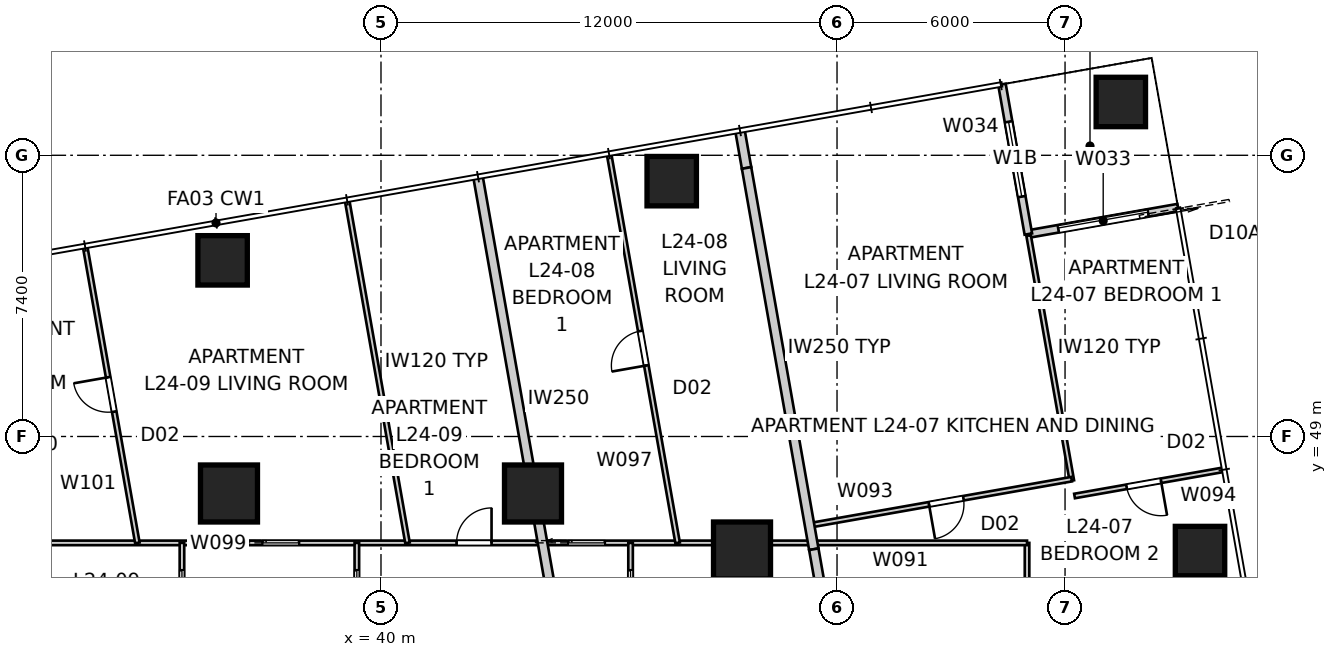
"""IFC4 building model, lengths in metres.
Left out: names, types, materials, properties, quantities, classifications, styles, units other than length and angle.
Written with IfcOpenShell. Run it as: python <this file> out.ifc"""

import sys

from ifc_helpers import new_model, si_unit, direction, frame, frame_2d, origin, origin_2d, place, context, subcontext, project, spatial, rectangle, extrude, element, fill, save


model = new_model("IFC4")
c1 = context("Model", 3, precision=1e-05, world=origin(), true_north=direction((0.0, 1.0)))
c2 = subcontext(c1, "Body", "Model", "MODEL_VIEW")
j1 = project(units=[si_unit("LENGTHUNIT", "METRE"), si_unit("PLANEANGLEUNIT", "RADIAN")], contexts=[c1])
p1 = place(None, origin())
s1 = spatial("IfcSite", under=j1, at=p1, CompositionType="ELEMENT")
p2 = place(p1, origin())
s2 = spatial("IfcBuilding", under=s1, at=p2, CompositionType="ELEMENT")
p3 = place(p2, frame((0.0, 0.0, 89.6)))
s3 = spatial("IfcBuildingStorey", under=s2, at=p3, CompositionType="ELEMENT", Elevation=89.6)
for number, where, z_axis, x_axis in (
    (1, (61.552, 45.985, 0.0), (0.0, 0.0, 1.0), (1.0, 0.0, 0.0)),
    (2, (59.468, 57.803, 0.0), (0.0, 0.0, 1.0), (1.0, 0.0, 0.0)),
    (3, (47.65, 55.719, 0.0), (0.0, 0.0, 1.0), (1.0, 0.0, 0.0)),
    (4, (35.833, 53.635, 0.0), (0.0, 0.0, 1.0), (1.0, 0.0, 0.0)),
):
    element("IfcColumn", number, at=place(p3, frame(where, z_axis=z_axis, x_axis=x_axis)), inside=s3, PredefinedType="COLUMN", context=c2, shape_type="SweptSolid", body=[
        extrude(rectangle(XDim=1.3, YDim=1.3, at=origin_2d()), origin(), (0.0, 0.0, 1.0), 3.4),
    ])
for number, where, z_axis, x_axis in (
    (5, (49.5, 46.0, 0.0), (0.0, 0.0, 1.0), (1.0, 0.0, 0.0)),
    (6, (44.0, 47.5, 0.0), (0.0, 0.0, 1.0), (1.0, 0.0, 0.0)),
    (7, (36.0, 47.5, 0.0), (0.0, 0.0, 1.0), (1.0, 0.0, 0.0)),
):
    element("IfcColumn", number, at=place(p3, frame(where, z_axis=z_axis, x_axis=x_axis)), inside=s3, PredefinedType="COLUMN", context=c2, shape_type="SweptSolid", body=[
        extrude(rectangle(XDim=1.5, YDim=1.5, at=origin_2d()), origin(), (0.0, 0.0, 1.0), 3.4),
    ])
p4 = place(p3, frame((60.974, 55.022, 0.0), z_axis=(0.0, 0.0, 1.0), x_axis=(-0.984808127031, -0.173646056486, 0.0)))
e8 = element("IfcWall", 8, at=p4, inside=s3, PredefinedType="SOLIDWALL", context=c2, shape_type="SweptSolid", body=[
    extrude(rectangle(XDim=4.0, YDim=0.2, at=frame_2d((2.0, 0.0))), origin(), (0.0, 0.0, 1.0), 3.25),
])
p5 = place(p4, frame((0.8, 0.0, 0.0)))
e9 = element("IfcOpeningElement", 9, at=p5, cuts=e8, PredefinedType="OPENING", context=c2, shape_type="SweptSolid", body=[
    extrude(rectangle(XDim=2.4, YDim=2.1, at=frame_2d((1.2, 1.05))), frame((0.0, 0.11, 0.0), z_axis=(0.0, -1.0, 0.0), x_axis=(1.0, 0.0, 0.0)), (0.0, 0.0, 1.0), 0.22),
])
p6 = place(p3, frame((57.034, 54.328, 0.0), z_axis=(0.0, 0.0, 1.0), x_axis=(-0.173646056486, 0.984808127031, 0.0)))
e10 = element("IfcWall", 10, at=p6, inside=s3, PredefinedType="SOLIDWALL", context=c2, shape_type="SweptSolid", body=[
    extrude(rectangle(XDim=4.0, YDim=0.2, at=frame_2d((2.0, 0.0))), origin(), (0.0, 0.0, 1.0), 3.25),
])
p7 = place(p6, frame((1.0, 0.0, 0.45)))
e11 = element("IfcOpeningElement", 11, at=p7, cuts=e10, PredefinedType="OPENING", context=c2, shape_type="SweptSolid", body=[
    extrude(rectangle(XDim=2.0, YDim=1.8, at=frame_2d((1.0, 0.9))), frame((0.0, 0.11, 0.0), z_axis=(0.0, -1.0, 0.0), x_axis=(1.0, 0.0, 0.0)), (0.0, 0.0, 1.0), 0.22),
])
p8 = place(p3, frame((42.552, 55.836, 0.0), z_axis=(0.0, 0.0, 1.0), x_axis=(0.173639677872, -0.984809251718, 0.0)))
e12 = element("IfcWall", 12, at=p8, inside=s3, PredefinedType="PARTITIONING", context=c2, shape_type="SweptSolid", body=[
    extrude(rectangle(XDim=12.24, YDim=0.25, at=frame_2d((6.12, 0.0))), origin(), (0.0, 0.0, 1.0), 3.25),
])
p9 = place(p3, frame((49.446, 57.051, 0.0), z_axis=(0.0, 0.0, 1.0), x_axis=(0.173813186416, -0.984778643263, 0.0)))
e13 = element("IfcWall", 13, at=p9, inside=s3, PredefinedType="PARTITIONING", context=c2, shape_type="SweptSolid", body=[
    extrude(rectangle(XDim=1.0, YDim=0.25, at=frame_2d((0.5, 0.0))), origin(), (0.0, 0.0, 1.0), 3.25),
])
p10 = place(p3, frame((49.62, 56.066, 0.0), z_axis=(0.0, 0.0, 1.0), x_axis=(0.173644522411, -0.984808397525, 0.0)))
e14 = element("IfcWall", 14, at=p10, inside=s3, PredefinedType="PARTITIONING", context=c2, shape_type="SweptSolid", body=[
    extrude(rectangle(XDim=10.188, YDim=0.25, at=frame_2d((5.094, 0.0))), origin(), (0.0, 0.0, 1.0), 2.638),
])
p11 = place(p3, frame((51.389, 46.033, 0.0), z_axis=(0.0, 0.0, 1.0), x_axis=(0.173657387043, -0.984806129106, 0.0)))
e15 = element("IfcWall", 15, at=p11, inside=s3, PredefinedType="PARTITIONING", context=c2, shape_type="SweptSolid", body=[
    extrude(rectangle(XDim=2.286, YDim=0.25, at=frame_2d((1.143, 0.0))), origin(), (0.0, 0.0, 1.0), 3.25),
])
p12 = place(p3, frame((57.0, 46.2, 0.0), z_axis=(0.0, 0.0, 1.0), x_axis=(0.0, -1.0, 0.0)))
e16 = element("IfcWall", 16, at=p12, inside=s3, PredefinedType="PARTITIONING", context=c2, shape_type="SweptSolid", body=[
    extrude(rectangle(XDim=32.4, YDim=0.12, at=frame_2d((16.2, 0.0))), origin(), (0.0, 0.0, 1.0), 2.55),
])
p13 = place(p12, frame((10.396, 0.0, 0.0)))
e17 = element("IfcOpeningElement", 17, at=p13, cuts=e16, PredefinedType="OPENING", context=c2, shape_type="SweptSolid", body=[
    extrude(rectangle(XDim=0.92, YDim=2.34, at=frame_2d((0.46, 1.17))), frame((0.0, 0.07, 0.0), z_axis=(0.0, -1.0, 0.0), x_axis=(1.0, 0.0, 0.0)), (0.0, 0.0, 1.0), 0.14),
])
p14 = place(p12, frame((7.587, 0.0, 0.0)))
e18 = element("IfcOpeningElement", 18, at=p14, cuts=e16, PredefinedType="OPENING", context=c2, shape_type="SweptSolid", body=[
    extrude(rectangle(XDim=0.92, YDim=2.34, at=frame_2d((0.46, 1.17))), frame((0.0, 0.07, 0.0), z_axis=(0.0, -1.0, 0.0), x_axis=(1.0, 0.0, 0.0)), (0.0, 0.0, 1.0), 0.14),
])
p15 = place(p12, frame((3.843, 0.0, 0.0)))
e19 = element("IfcOpeningElement", 19, at=p15, cuts=e16, PredefinedType="OPENING", context=c2, shape_type="SweptSolid", body=[
    extrude(rectangle(XDim=0.92, YDim=2.34, at=frame_2d((0.46, 1.17))), frame((0.0, 0.07, 0.0), z_axis=(0.0, -1.0, 0.0), x_axis=(1.0, 0.0, 0.0)), (0.0, 0.0, 1.0), 0.14),
])
p16 = place(p12, frame((27.988, 0.0, 0.0)))
e20 = element("IfcOpeningElement", 20, at=p16, cuts=e16, PredefinedType="OPENING", context=c2, shape_type="SweptSolid", body=[
    extrude(rectangle(XDim=0.92, YDim=2.34, at=frame_2d((0.46, 1.17))), frame((0.0, 0.07, 0.0), z_axis=(0.0, -1.0, 0.0), x_axis=(1.0, 0.0, 0.0)), (0.0, 0.0, 1.0), 0.14),
])
p17 = place(p12, frame((23.957, 0.0, 0.0)))
e21 = element("IfcOpeningElement", 21, at=p17, cuts=e16, PredefinedType="OPENING", context=c2, shape_type="SweptSolid", body=[
    extrude(rectangle(XDim=0.96, YDim=2.1, at=frame_2d((0.48, 1.05))), frame((0.0, 0.07, 0.0), z_axis=(0.0, -1.0, 0.0), x_axis=(1.0, 0.0, 0.0)), (0.0, 0.0, 1.0), 0.14),
])
p18 = place(p12, frame((21.108, 0.0, 0.0)))
e22 = element("IfcOpeningElement", 22, at=p18, cuts=e16, PredefinedType="OPENING", context=c2, shape_type="SweptSolid", body=[
    extrude(rectangle(XDim=0.96, YDim=2.1, at=frame_2d((0.48, 1.05))), frame((0.0, 0.07, 0.0), z_axis=(0.0, -1.0, 0.0), x_axis=(1.0, 0.0, 0.0)), (0.0, 0.0, 1.0), 0.14),
])
p19 = place(p3, frame((23.0, 46.2, 0.0), z_axis=(0.0, 0.0, 1.0), x_axis=(1.0, 0.0, 0.0)))
e23 = element("IfcWall", 23, at=p19, inside=s3, PredefinedType="PARTITIONING", context=c2, shape_type="SweptSolid", body=[
    extrude(rectangle(XDim=34.0, YDim=0.12, at=frame_2d((17.0, 0.0))), origin(), (0.0, 0.0, 1.0), 2.55),
])
p20 = place(p19, frame((18.989, 0.0, 0.0)))
e24 = element("IfcOpeningElement", 24, at=p20, cuts=e23, PredefinedType="OPENING", context=c2, shape_type="SweptSolid", body=[
    extrude(rectangle(XDim=0.92, YDim=2.34, at=frame_2d((0.46, 1.17))), frame((0.0, 0.07, 0.0), z_axis=(0.0, -1.0, 0.0), x_axis=(1.0, 0.0, 0.0)), (0.0, 0.0, 1.0), 0.14),
])
p21 = place(p19, frame((1.306, 0.0, 0.0)))
e25 = element("IfcOpeningElement", 25, at=p21, cuts=e23, PredefinedType="OPENING", context=c2, shape_type="SweptSolid", body=[
    extrude(rectangle(XDim=0.92, YDim=2.34, at=frame_2d((0.46, 1.17))), frame((0.0, 0.07, 0.0), z_axis=(0.0, -1.0, 0.0), x_axis=(1.0, 0.0, 0.0)), (0.0, 0.0, 1.0), 0.14),
])
p22 = place(p19, frame((13.884, 0.0, 0.0)))
e26 = element("IfcOpeningElement", 26, at=p22, cuts=e23, PredefinedType="OPENING", context=c2, shape_type="SweptSolid", body=[
    extrude(rectangle(XDim=0.96, YDim=2.1, at=frame_2d((0.48, 1.05))), frame((0.0, 0.07, 0.0), z_axis=(0.0, -1.0, 0.0), x_axis=(1.0, 0.0, 0.0)), (0.0, 0.0, 1.0), 0.14),
])
p23 = place(p19, frame((21.929, 0.0, 0.0)))
e27 = element("IfcOpeningElement", 27, at=p23, cuts=e23, PredefinedType="OPENING", context=c2, shape_type="SweptSolid", body=[
    extrude(rectangle(XDim=0.96, YDim=2.1, at=frame_2d((0.48, 1.05))), frame((0.0, 0.07, 0.0), z_axis=(0.0, -1.0, 0.0), x_axis=(1.0, 0.0, 0.0)), (0.0, 0.0, 1.0), 0.14),
])
p24 = place(p3, frame((57.041, 54.288, 0.0), z_axis=(0.0, 0.0, 1.0), x_axis=(0.173657751636, -0.984806064815, 0.0)))
e28 = element("IfcWall", 28, at=p24, inside=s3, PredefinedType="PARTITIONING", context=c2, shape_type="SweptSolid", body=[
    extrude(rectangle(XDim=6.55, YDim=0.12, at=frame_2d((3.275, 0.0))), origin(), (0.0, 0.0, 1.0), 3.25),
])
p25 = place(p3, frame((58.172, 47.877, 0.0), z_axis=(0.0, 0.0, 1.0), x_axis=(-0.984806372973, -0.173656004074, 0.0)))
e29 = element("IfcWall", 29, at=p25, inside=s3, PredefinedType="PARTITIONING", context=c2, shape_type="SweptSolid", body=[
    extrude(rectangle(XDim=7.0, YDim=0.12, at=frame_2d((3.5, 0.0))), origin(), (0.0, 0.0, 1.0), 3.25),
])
p26 = place(p25, frame((2.89, 0.0, 0.0)))
e30 = element("IfcOpeningElement", 30, at=p26, cuts=e29, PredefinedType="OPENING", context=c2, shape_type="SweptSolid", body=[
    extrude(rectangle(XDim=0.92, YDim=2.34, at=frame_2d((0.46, 1.17))), frame((0.0, 0.07, 0.0), z_axis=(0.0, -1.0, 0.0), x_axis=(1.0, 0.0, 0.0)), (0.0, 0.0, 1.0), 0.14),
])
p27 = place(p3, frame((62.15, 48.122, 0.0), z_axis=(0.0, 0.0, 1.0), x_axis=(-0.984804033163, -0.173669272657, 0.0)))
e31 = element("IfcWall", 31, at=p27, inside=s3, PredefinedType="PARTITIONING", context=c2, shape_type="SweptSolid", body=[
    extrude(rectangle(XDim=3.96, YDim=0.12, at=frame_2d((1.98, 0.0))), origin(), (0.0, 0.0, 1.0), 2.638),
])
p28 = place(p27, frame((1.65, 0.0, 0.0)))
e32 = element("IfcOpeningElement", 32, at=p28, cuts=e31, PredefinedType="OPENING", context=c2, shape_type="SweptSolid", body=[
    extrude(rectangle(XDim=0.92, YDim=2.34, at=frame_2d((0.46, 1.17))), frame((0.0, 0.07, 0.0), z_axis=(0.0, -1.0, 0.0), x_axis=(1.0, 0.0, 0.0)), (0.0, 0.0, 1.0), 0.14),
])
p29 = place(p3, frame((46.567, 43.8, 0.0), z_axis=(0.0, 0.0, 1.0), x_axis=(0.0, 1.0, 0.0)))
e33 = element("IfcWall", 33, at=p29, inside=s3, PredefinedType="PARTITIONING", context=c2, shape_type="SweptSolid", body=[
    extrude(rectangle(XDim=2.4, YDim=0.12, at=frame_2d((1.2, 0.0))), origin(), (0.0, 0.0, 1.0), 3.25),
])
p30 = place(p29, frame((0.72, 0.0, 0.0)))
e34 = element("IfcOpeningElement", 34, at=p30, cuts=e33, PredefinedType="OPENING", context=c2, shape_type="SweptSolid", body=[
    extrude(rectangle(XDim=0.96, YDim=2.1, at=frame_2d((0.48, 1.05))), frame((0.0, 0.07, 0.0), z_axis=(0.0, -1.0, 0.0), x_axis=(1.0, 0.0, 0.0)), (0.0, 0.0, 1.0), 0.14),
])
p31 = place(p3, frame((47.805, 46.2, 0.0), z_axis=(0.0, 0.0, 1.0), x_axis=(-0.173653605279, 0.984806795962, 0.0)))
e35 = element("IfcWall", 35, at=p31, inside=s3, PredefinedType="PARTITIONING", context=c2, shape_type="SweptSolid", body=[
    extrude(rectangle(XDim=10.362, YDim=0.12, at=frame_2d((5.181, 0.0))), origin(), (0.0, 0.0, 1.0), 3.25),
])
p32 = place(p31, frame((4.741, 0.0, 0.0)))
e36 = element("IfcOpeningElement", 36, at=p32, cuts=e35, PredefinedType="OPENING", context=c2, shape_type="SweptSolid", body=[
    extrude(rectangle(XDim=0.92, YDim=2.34, at=frame_2d((0.46, 1.17))), frame((0.0, 0.07, 0.0), z_axis=(0.0, -1.0, 0.0), x_axis=(1.0, 0.0, 0.0)), (0.0, 0.0, 1.0), 0.14),
])
p33 = place(p3, frame((39.365, 43.8, 0.0), z_axis=(0.0, 0.0, 1.0), x_axis=(0.0, 1.0, 0.0)))
e37 = element("IfcWall", 37, at=p33, inside=s3, PredefinedType="PARTITIONING", context=c2, shape_type="SweptSolid", body=[
    extrude(rectangle(XDim=2.4, YDim=0.12, at=frame_2d((1.2, 0.0))), origin(), (0.0, 0.0, 1.0), 3.25),
])
p34 = place(p33, frame((0.72, 0.0, 0.0)))
e38 = element("IfcOpeningElement", 38, at=p34, cuts=e37, PredefinedType="OPENING", context=c2, shape_type="SweptSolid", body=[
    extrude(rectangle(XDim=0.96, YDim=2.1, at=frame_2d((0.48, 1.05))), frame((0.0, 0.07, 0.0), z_axis=(0.0, -1.0, 0.0), x_axis=(1.0, 0.0, 0.0)), (0.0, 0.0, 1.0), 0.14),
])
p35 = place(p3, frame((34.763, 43.8, 0.0), z_axis=(0.0, 0.0, 1.0), x_axis=(0.0, 1.0, 0.0)))
e39 = element("IfcWall", 39, at=p35, inside=s3, PredefinedType="PARTITIONING", context=c2, shape_type="SweptSolid", body=[
    extrude(rectangle(XDim=2.4, YDim=0.12, at=frame_2d((1.2, 0.0))), origin(), (0.0, 0.0, 1.0), 3.25),
])
p36 = place(p35, frame((0.72, 0.0, 0.0)))
e40 = element("IfcOpeningElement", 40, at=p36, cuts=e39, PredefinedType="OPENING", context=c2, shape_type="SweptSolid", body=[
    extrude(rectangle(XDim=0.96, YDim=2.1, at=frame_2d((0.48, 1.05))), frame((0.0, 0.07, 0.0), z_axis=(0.0, -1.0, 0.0), x_axis=(1.0, 0.0, 0.0)), (0.0, 0.0, 1.0), 0.14),
])
p37 = place(p3, frame((39.113, 55.188, 0.0), z_axis=(0.0, 0.0, 1.0), x_axis=(0.173652576186, -0.984806977424, 0.0)))
e41 = element("IfcWall", 41, at=p37, inside=s3, PredefinedType="PARTITIONING", context=c2, shape_type="SweptSolid", body=[
    extrude(rectangle(XDim=9.127, YDim=0.12, at=frame_2d((4.563, 0.0))), origin(), (0.0, 0.0, 1.0), 3.25),
])
p38 = place(p3, frame((33.59, 46.2, 0.0), z_axis=(0.0, 0.0, 1.0), x_axis=(-0.173645935638, 0.98480814834, 0.0)))
e42 = element("IfcWall", 42, at=p38, inside=s3, PredefinedType="PARTITIONING", context=c2, shape_type="SweptSolid", body=[
    extrude(rectangle(XDim=7.893, YDim=0.12, at=frame_2d((3.947, 0.0))), origin(), (0.0, 0.0, 1.0), 3.25),
])
p39 = place(p38, frame((3.507, 0.0, 0.0)))
e43 = element("IfcOpeningElement", 43, at=p39, cuts=e42, PredefinedType="OPENING", context=c2, shape_type="SweptSolid", body=[
    extrude(rectangle(XDim=0.92, YDim=2.34, at=frame_2d((0.46, 1.17))), frame((0.0, 0.07, 0.0), z_axis=(0.0, -1.0, 0.0), x_axis=(1.0, 0.0, 0.0)), (0.0, 0.0, 1.0), 0.14),
])
p40 = place(p5, origin())
e44 = element("IfcDoor", 44, at=p40, inside=s3, OperationType="SLIDING_TO_LEFT", PredefinedType="DOOR", context=c2, shape_type="SweptSolid", body=[
    extrude(rectangle(XDim=2.4, YDim=2.1, at=frame_2d((1.2, 1.05))), frame((0.0, 0.025, 0.0), z_axis=(0.0, -1.0, 0.0), x_axis=(1.0, 0.0, 0.0)), (0.0, 0.0, 1.0), 0.05),
])
fill(e9, e44)
p41 = place(p7, origin())
e45 = element("IfcWindow", 45, at=p41, inside=s3, PartitioningType="SINGLE_PANEL", PredefinedType="WINDOW", context=c2, shape_type="SweptSolid", body=[
    extrude(rectangle(XDim=2.0, YDim=1.8, at=frame_2d((1.0, 0.9))), frame((0.0, 0.03, 0.0), z_axis=(0.0, -1.0, 0.0), x_axis=(1.0, 0.0, 0.0)), (0.0, 0.0, 1.0), 0.06),
])
fill(e11, e45)
p42 = place(p20, origin())
e46 = element("IfcDoor", 46, at=p42, inside=s3, OperationType="SINGLE_SWING_RIGHT", PredefinedType="DOOR", context=c2, shape_type="SweptSolid", body=[
    extrude(rectangle(XDim=0.92, YDim=2.34, at=frame_2d((0.46, 1.17))), frame((0.0, 0.025, 0.0), z_axis=(0.0, -1.0, 0.0), x_axis=(1.0, 0.0, 0.0)), (0.0, 0.0, 1.0), 0.05),
])
fill(e24, e46)
p43 = place(p34, origin())
e47 = element("IfcDoor", 47, at=p43, inside=s3, OperationType="SLIDING_TO_LEFT", PredefinedType="DOOR", context=c2, shape_type="SweptSolid", body=[
    extrude(rectangle(XDim=0.96, YDim=2.1, at=frame_2d((0.48, 1.05))), frame((0.0, 0.025, 0.0), z_axis=(0.0, -1.0, 0.0), x_axis=(1.0, 0.0, 0.0)), (0.0, 0.0, 1.0), 0.05),
])
fill(e38, e47)
p44 = place(p30, origin())
e48 = element("IfcDoor", 48, at=p44, inside=s3, OperationType="SLIDING_TO_LEFT", PredefinedType="DOOR", context=c2, shape_type="SweptSolid", body=[
    extrude(rectangle(XDim=0.96, YDim=2.1, at=frame_2d((0.48, 1.05))), frame((0.0, 0.025, 0.0), z_axis=(0.0, -1.0, 0.0), x_axis=(1.0, 0.0, 0.0)), (0.0, 0.0, 1.0), 0.05),
])
fill(e34, e48)
p45 = place(p22, origin())
e49 = element("IfcDoor", 49, at=p45, inside=s3, OperationType="SLIDING_TO_LEFT", PredefinedType="DOOR", context=c2, shape_type="SweptSolid", body=[
    extrude(rectangle(XDim=0.96, YDim=2.1, at=frame_2d((0.48, 1.05))), frame((0.0, 0.025, 0.0), z_axis=(0.0, -1.0, 0.0), x_axis=(1.0, 0.0, 0.0)), (0.0, 0.0, 1.0), 0.05),
])
fill(e26, e49)
p46 = place(p36, origin())
e50 = element("IfcDoor", 50, at=p46, inside=s3, OperationType="SLIDING_TO_LEFT", PredefinedType="DOOR", context=c2, shape_type="SweptSolid", body=[
    extrude(rectangle(XDim=0.96, YDim=2.1, at=frame_2d((0.48, 1.05))), frame((0.0, 0.025, 0.0), z_axis=(0.0, -1.0, 0.0), x_axis=(1.0, 0.0, 0.0)), (0.0, 0.0, 1.0), 0.05),
])
fill(e40, e50)
p47 = place(p23, origin())
e51 = element("IfcDoor", 51, at=p47, inside=s3, OperationType="SLIDING_TO_LEFT", PredefinedType="DOOR", context=c2, shape_type="SweptSolid", body=[
    extrude(rectangle(XDim=0.96, YDim=2.1, at=frame_2d((0.48, 1.05))), frame((0.0, 0.025, 0.0), z_axis=(0.0, -1.0, 0.0), x_axis=(1.0, 0.0, 0.0)), (0.0, 0.0, 1.0), 0.05),
])
fill(e27, e51)
p48 = place(p39, origin())
e52 = element("IfcDoor", 52, at=p48, inside=s3, OperationType="SINGLE_SWING_RIGHT", PredefinedType="DOOR", context=c2, shape_type="SweptSolid", body=[
    extrude(rectangle(XDim=0.92, YDim=2.34, at=frame_2d((0.46, 1.17))), frame((0.0, 0.025, 0.0), z_axis=(0.0, -1.0, 0.0), x_axis=(1.0, 0.0, 0.0)), (0.0, 0.0, 1.0), 0.05),
])
fill(e43, e52)
p49 = place(p32, origin())
e53 = element("IfcDoor", 53, at=p49, inside=s3, OperationType="SINGLE_SWING_LEFT", PredefinedType="DOOR", context=c2, shape_type="SweptSolid", body=[
    extrude(rectangle(XDim=0.92, YDim=2.34, at=frame_2d((0.46, 1.17))), frame((0.0, 0.025, 0.0), z_axis=(0.0, -1.0, 0.0), x_axis=(1.0, 0.0, 0.0)), (0.0, 0.0, 1.0), 0.05),
])
fill(e36, e53)
p50 = place(p26, origin())
e54 = element("IfcDoor", 54, at=p50, inside=s3, OperationType="SINGLE_SWING_RIGHT", PredefinedType="DOOR", context=c2, shape_type="SweptSolid", body=[
    extrude(rectangle(XDim=0.92, YDim=2.34, at=frame_2d((0.46, 1.17))), frame((0.0, 0.025, 0.0), z_axis=(0.0, -1.0, 0.0), x_axis=(1.0, 0.0, 0.0)), (0.0, 0.0, 1.0), 0.05),
])
fill(e30, e54)
p51 = place(p28, origin())
e55 = element("IfcDoor", 55, at=p51, inside=s3, OperationType="SINGLE_SWING_LEFT", PredefinedType="DOOR", context=c2, shape_type="SweptSolid", body=[
    extrude(rectangle(XDim=0.92, YDim=2.34, at=frame_2d((0.46, 1.17))), frame((0.0, 0.025, 0.0), z_axis=(0.0, -1.0, 0.0), x_axis=(1.0, 0.0, 0.0)), (0.0, 0.0, 1.0), 0.05),
])
fill(e32, e55)
save(model, sys.argv[1])
